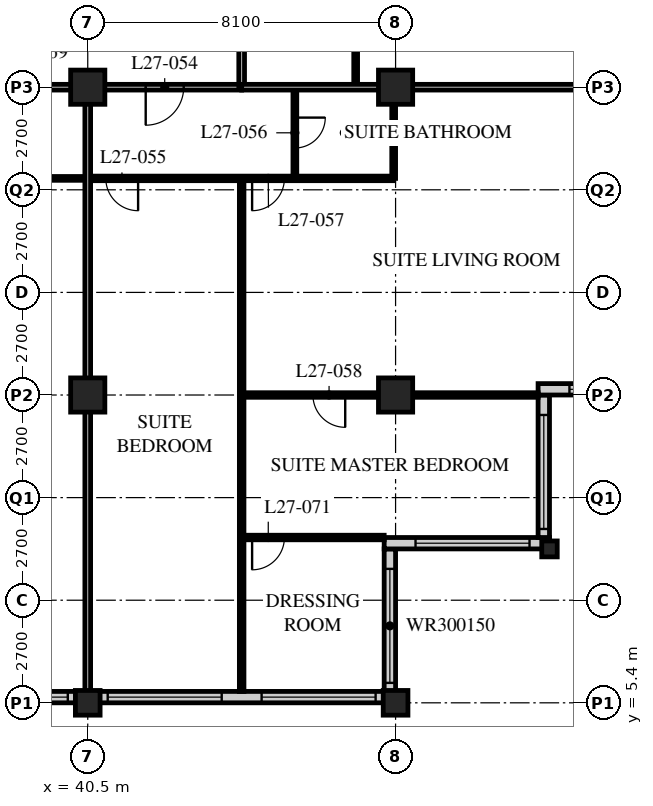
"""IFC4 building model, lengths in metres.
Left out: names, types, materials, properties, quantities, classifications, styles, units other than length and angle.
Written with IfcOpenShell. Run it as: python <this file> out.ifc"""

import sys

from ifc_helpers import new_model, si_unit, direction, frame, frame_2d, origin, origin_2d, place, context, subcontext, project, spatial, rectangle, hollow_rectangle, i_section, extrude, element, fill, save


model = new_model("IFC4")
c1 = context("Model", 3, precision=1e-05, world=origin(), true_north=direction((0.0, 1.0)))
c2 = subcontext(c1, "Body", "Model", "MODEL_VIEW")
j1 = project(units=[si_unit("LENGTHUNIT", "METRE"), si_unit("PLANEANGLEUNIT", "RADIAN")], contexts=[c1])
p1 = place(None, origin())
s1 = spatial("IfcSite", under=j1, at=p1, CompositionType="ELEMENT")
p2 = place(p1, origin())
s2 = spatial("IfcBuilding", under=s1, at=p2, CompositionType="ELEMENT")
p3 = place(p2, frame((0.0, 0.0, 110.2)))
s3 = spatial("IfcBuildingStorey", under=s2, at=p3, CompositionType="ELEMENT", Elevation=110.2)
p4 = place(p3, frame((40.5, 5.4, 0.0), z_axis=(0.0, 0.0, 1.0), x_axis=(1.0, 0.0, 0.0)))
e1 = element("IfcColumn", 1, at=p4, inside=s3, PredefinedType="COLUMN", context=c2, shape_type="SweptSolid", body=[
    extrude(hollow_rectangle(XDim=0.65, YDim=0.65, WallThickness=0.055, at=origin_2d()), origin(), (0.0, 0.0, 1.0), 3.4),
])
for number, where, z_axis, x_axis in (
    (2, (40.5, 13.5, 0.0), (0.0, 0.0, 1.0), (1.0, 0.0, 0.0)),
    (3, (40.5, 21.6, 0.0), (0.0, 0.0, 1.0), (1.0, 0.0, 0.0)),
):
    element("IfcColumn", number, at=place(p3, frame(where, z_axis=z_axis, x_axis=x_axis)), inside=s3, PredefinedType="COLUMN", context=c2, shape_type="SweptSolid", body=[
        extrude(hollow_rectangle(XDim=0.9, YDim=0.9, WallThickness=0.09, at=origin_2d()), origin(), (0.0, 0.0, 1.0), 3.4),
    ])
p5 = place(p3, frame((48.6, 5.4, 0.0), z_axis=(0.0, 0.0, 1.0), x_axis=(1.0, 0.0, 0.0)))
e4 = element("IfcColumn", 4, at=p5, inside=s3, PredefinedType="COLUMN", context=c2, shape_type="SweptSolid", body=[
    extrude(hollow_rectangle(XDim=0.65, YDim=0.65, WallThickness=0.055, at=origin_2d()), origin(), (0.0, 0.0, 1.0), 3.4),
])
for number, where, z_axis, x_axis in (
    (5, (48.6, 13.5, 0.0), (0.0, 0.0, 1.0), (1.0, 0.0, 0.0)),
    (6, (48.6, 21.6, 0.0), (0.0, 0.0, 1.0), (1.0, 0.0, 0.0)),
):
    element("IfcColumn", number, at=place(p3, frame(where, z_axis=z_axis, x_axis=x_axis)), inside=s3, PredefinedType="COLUMN", context=c2, shape_type="SweptSolid", body=[
        extrude(hollow_rectangle(XDim=0.9, YDim=0.9, WallThickness=0.09, at=origin_2d()), origin(), (0.0, 0.0, 1.0), 3.4),
    ])
p6 = place(p3, frame((52.65, 9.45, 0.0), z_axis=(0.0, 0.0, 1.0), x_axis=(1.0, 0.0, 0.0)))
e7 = element("IfcColumn", 7, at=p6, inside=s3, PredefinedType="COLUMN", context=c2, shape_type="SweptSolid", body=[
    extrude(i_section(OverallWidth=0.407, OverallDepth=0.419, WebThickness=0.031, FlangeThickness=0.049, FilletRadius=0.015, at=origin_2d()), origin(), (0.0, 0.0, 1.0), 3.4),
])
p7 = place(p3, frame((8.4, 5.55, 0.0), z_axis=(0.0, 0.0, 1.0), x_axis=(1.0, 0.0, 0.0)))
e8 = element("IfcWall", 8, at=p7, inside=s3, PredefinedType="SOLIDWALL", context=c2, shape_type="SweptSolid", body=[
    extrude(rectangle(XDim=40.2, YDim=0.3, at=frame_2d((20.1, 0.0))), origin(), (0.0, 0.0, 1.0), 3.19),
])
p8 = place(p7, frame((0.225, 0.0, 0.9)))
e9 = element("IfcOpeningElement", 9, at=p8, cuts=e8, PredefinedType="OPENING", context=c2, shape_type="SweptSolid", body=[
    extrude(rectangle(XDim=3.0, YDim=2.0, at=frame_2d((1.5, 1.0))), frame((0.0, 0.16, 0.0), z_axis=(0.0, -1.0, 0.0), x_axis=(1.0, 0.0, 0.0)), (0.0, 0.0, 1.0), 0.32),
])
p9 = place(p7, frame((4.275, 0.0, 0.9)))
e10 = element("IfcOpeningElement", 10, at=p9, cuts=e8, PredefinedType="OPENING", context=c2, shape_type="SweptSolid", body=[
    extrude(rectangle(XDim=3.0, YDim=2.0, at=frame_2d((1.5, 1.0))), frame((0.0, 0.16, 0.0), z_axis=(0.0, -1.0, 0.0), x_axis=(1.0, 0.0, 0.0)), (0.0, 0.0, 1.0), 0.32),
])
p10 = place(p7, frame((8.325, 0.0, 0.9)))
e11 = element("IfcOpeningElement", 11, at=p10, cuts=e8, PredefinedType="OPENING", context=c2, shape_type="SweptSolid", body=[
    extrude(rectangle(XDim=3.0, YDim=2.0, at=frame_2d((1.5, 1.0))), frame((0.0, 0.16, 0.0), z_axis=(0.0, -1.0, 0.0), x_axis=(1.0, 0.0, 0.0)), (0.0, 0.0, 1.0), 0.32),
])
p11 = place(p7, frame((12.375, 0.0, 0.9)))
e12 = element("IfcOpeningElement", 12, at=p11, cuts=e8, PredefinedType="OPENING", context=c2, shape_type="SweptSolid", body=[
    extrude(rectangle(XDim=3.0, YDim=2.0, at=frame_2d((1.5, 1.0))), frame((0.0, 0.16, 0.0), z_axis=(0.0, -1.0, 0.0), x_axis=(1.0, 0.0, 0.0)), (0.0, 0.0, 1.0), 0.32),
])
p12 = place(p7, frame((16.425, 0.0, 0.9)))
e13 = element("IfcOpeningElement", 13, at=p12, cuts=e8, PredefinedType="OPENING", context=c2, shape_type="SweptSolid", body=[
    extrude(rectangle(XDim=3.0, YDim=2.0, at=frame_2d((1.5, 1.0))), frame((0.0, 0.16, 0.0), z_axis=(0.0, -1.0, 0.0), x_axis=(1.0, 0.0, 0.0)), (0.0, 0.0, 1.0), 0.32),
])
p13 = place(p7, frame((20.475, 0.0, 0.9)))
e14 = element("IfcOpeningElement", 14, at=p13, cuts=e8, PredefinedType="OPENING", context=c2, shape_type="SweptSolid", body=[
    extrude(rectangle(XDim=3.0, YDim=2.0, at=frame_2d((1.5, 1.0))), frame((0.0, 0.16, 0.0), z_axis=(0.0, -1.0, 0.0), x_axis=(1.0, 0.0, 0.0)), (0.0, 0.0, 1.0), 0.32),
])
p14 = place(p7, frame((24.525, 0.0, 0.9)))
e15 = element("IfcOpeningElement", 15, at=p14, cuts=e8, PredefinedType="OPENING", context=c2, shape_type="SweptSolid", body=[
    extrude(rectangle(XDim=3.0, YDim=2.0, at=frame_2d((1.5, 1.0))), frame((0.0, 0.16, 0.0), z_axis=(0.0, -1.0, 0.0), x_axis=(1.0, 0.0, 0.0)), (0.0, 0.0, 1.0), 0.32),
])
p15 = place(p7, frame((28.575, 0.0, 0.9)))
e16 = element("IfcOpeningElement", 16, at=p15, cuts=e8, PredefinedType="OPENING", context=c2, shape_type="SweptSolid", body=[
    extrude(rectangle(XDim=3.0, YDim=2.0, at=frame_2d((1.5, 1.0))), frame((0.0, 0.16, 0.0), z_axis=(0.0, -1.0, 0.0), x_axis=(1.0, 0.0, 0.0)), (0.0, 0.0, 1.0), 0.32),
])
p16 = place(p7, frame((32.625, 0.0, 0.9)))
e17 = element("IfcOpeningElement", 17, at=p16, cuts=e8, PredefinedType="OPENING", context=c2, shape_type="SweptSolid", body=[
    extrude(rectangle(XDim=3.0, YDim=2.0, at=frame_2d((1.5, 1.0))), frame((0.0, 0.16, 0.0), z_axis=(0.0, -1.0, 0.0), x_axis=(1.0, 0.0, 0.0)), (0.0, 0.0, 1.0), 0.32),
])
p17 = place(p7, frame((36.675, 0.0, 0.9)))
e18 = element("IfcOpeningElement", 18, at=p17, cuts=e8, PredefinedType="OPENING", context=c2, shape_type="SweptSolid", body=[
    extrude(rectangle(XDim=3.0, YDim=2.0, at=frame_2d((1.5, 1.0))), frame((0.0, 0.16, 0.0), z_axis=(0.0, -1.0, 0.0), x_axis=(1.0, 0.0, 0.0)), (0.0, 0.0, 1.0), 0.32),
])
p18 = place(p3, frame((48.45, 5.7, 0.0), z_axis=(0.0, 0.0, 1.0), x_axis=(0.0, 1.0, 0.0)))
e19 = element("IfcWall", 19, at=p18, inside=s3, PredefinedType="SOLIDWALL", context=c2, shape_type="SweptSolid", body=[
    extrude(rectangle(XDim=3.75, YDim=0.3, at=frame_2d((1.875, 0.0))), origin(), (0.0, 0.0, 1.0), 3.19),
])
p19 = place(p18, frame((0.225, 0.0, 0.9)))
e20 = element("IfcOpeningElement", 20, at=p19, cuts=e19, PredefinedType="OPENING", context=c2, shape_type="SweptSolid", body=[
    extrude(rectangle(XDim=3.0, YDim=1.5, at=frame_2d((1.5, 0.75))), frame((0.0, 0.16, 0.0), z_axis=(0.0, -1.0, 0.0), x_axis=(1.0, 0.0, 0.0)), (0.0, 0.0, 1.0), 0.32),
])
p20 = place(p3, frame((48.3, 9.6, 0.0), z_axis=(0.0, 0.0, 1.0), x_axis=(1.0, 0.0, 0.0)))
e21 = element("IfcWall", 21, at=p20, inside=s3, PredefinedType="SOLIDWALL", context=c2, shape_type="SweptSolid", body=[
    extrude(rectangle(XDim=4.35, YDim=0.3, at=frame_2d((2.175, 0.0))), origin(), (0.0, 0.0, 1.0), 3.19),
])
p21 = place(p20, frame((0.825, 0.0, 0.9)))
e22 = element("IfcOpeningElement", 22, at=p21, cuts=e21, PredefinedType="OPENING", context=c2, shape_type="SweptSolid", body=[
    extrude(rectangle(XDim=3.0, YDim=1.5, at=frame_2d((1.5, 0.75))), frame((0.0, 0.16, 0.0), z_axis=(0.0, -1.0, 0.0), x_axis=(1.0, 0.0, 0.0)), (0.0, 0.0, 1.0), 0.32),
])
p22 = place(p3, frame((52.5, 9.75, 0.0), z_axis=(0.0, 0.0, 1.0), x_axis=(0.0, 1.0, 0.0)))
e23 = element("IfcWall", 23, at=p22, inside=s3, PredefinedType="SOLIDWALL", context=c2, shape_type="SweptSolid", body=[
    extrude(rectangle(XDim=3.75, YDim=0.3, at=frame_2d((1.875, 0.0))), origin(), (0.0, 0.0, 1.0), 3.19),
])
p23 = place(p22, frame((0.225, 0.0, 0.9)))
e24 = element("IfcOpeningElement", 24, at=p23, cuts=e23, PredefinedType="OPENING", context=c2, shape_type="SweptSolid", body=[
    extrude(rectangle(XDim=3.0, YDim=1.5, at=frame_2d((1.5, 0.75))), frame((0.0, 0.16, 0.0), z_axis=(0.0, -1.0, 0.0), x_axis=(1.0, 0.0, 0.0)), (0.0, 0.0, 1.0), 0.32),
])
p24 = place(p3, frame((52.35, 13.65, 0.0), z_axis=(0.0, 0.0, 1.0), x_axis=(1.0, 0.0, 0.0)))
e25 = element("IfcWall", 25, at=p24, inside=s3, PredefinedType="SOLIDWALL", context=c2, shape_type="SweptSolid", body=[
    extrude(rectangle(XDim=4.35, YDim=0.3, at=frame_2d((2.175, 0.0))), origin(), (0.0, 0.0, 1.0), 3.19),
])
p25 = place(p24, frame((0.825, 0.0, 0.9)))
e26 = element("IfcOpeningElement", 26, at=p25, cuts=e25, PredefinedType="OPENING", context=c2, shape_type="SweptSolid", body=[
    extrude(rectangle(XDim=3.0, YDim=1.5, at=frame_2d((1.5, 0.75))), frame((0.0, 0.16, 0.0), z_axis=(0.0, -1.0, 0.0), x_axis=(1.0, 0.0, 0.0)), (0.0, 0.0, 1.0), 0.32),
])
p26 = place(p3, frame((12.15, 21.6, 0.0), z_axis=(0.0, 0.0, 1.0), x_axis=(1.0, 0.0, 0.0)))
e27 = element("IfcWall", 27, at=p26, inside=s3, PredefinedType="PARTITIONING", context=c2, shape_type="SweptSolid", body=[
    extrude(rectangle(XDim=32.4, YDim=0.15, at=frame_2d((16.2, 0.0))), origin(), (0.0, 0.0, 1.0), 2.578),
])
p27 = place(p26, frame((5.95, 0.0, 0.0)))
e28 = element("IfcOpeningElement", 28, at=p27, cuts=e27, PredefinedType="OPENING", context=c2, shape_type="SweptSolid", body=[
    extrude(rectangle(XDim=1.0, YDim=2.1, at=frame_2d((0.5, 1.05))), frame((0.0, 0.085, 0.0), z_axis=(0.0, -1.0, 0.0), x_axis=(1.0, 0.0, 0.0)), (0.0, 0.0, 1.0), 0.17),
])
p28 = place(p26, frame((14.05, 0.0, 0.0)))
e29 = element("IfcOpeningElement", 29, at=p28, cuts=e27, PredefinedType="OPENING", context=c2, shape_type="SweptSolid", body=[
    extrude(rectangle(XDim=1.0, YDim=2.1, at=frame_2d((0.5, 1.05))), frame((0.0, 0.085, 0.0), z_axis=(0.0, -1.0, 0.0), x_axis=(1.0, 0.0, 0.0)), (0.0, 0.0, 1.0), 0.17),
])
p29 = place(p26, frame((22.15, 0.0, 0.0)))
e30 = element("IfcOpeningElement", 30, at=p29, cuts=e27, PredefinedType="OPENING", context=c2, shape_type="SweptSolid", body=[
    extrude(rectangle(XDim=1.0, YDim=2.1, at=frame_2d((0.5, 1.05))), frame((0.0, 0.085, 0.0), z_axis=(0.0, -1.0, 0.0), x_axis=(1.0, 0.0, 0.0)), (0.0, 0.0, 1.0), 0.17),
])
p30 = place(p26, frame((1.525, 0.0, 0.0)))
e31 = element("IfcOpeningElement", 31, at=p30, cuts=e27, PredefinedType="OPENING", context=c2, shape_type="SweptSolid", body=[
    extrude(rectangle(XDim=1.0, YDim=2.1, at=frame_2d((0.5, 1.05))), frame((0.0, 0.085, 0.0), z_axis=(0.0, -1.0, 0.0), x_axis=(1.0, 0.0, 0.0)), (0.0, 0.0, 1.0), 0.17),
])
p31 = place(p26, frame((29.875, 0.0, 0.0)))
e32 = element("IfcOpeningElement", 32, at=p31, cuts=e27, PredefinedType="OPENING", context=c2, shape_type="SweptSolid", body=[
    extrude(rectangle(XDim=1.0, YDim=2.1, at=frame_2d((0.5, 1.05))), frame((0.0, 0.085, 0.0), z_axis=(0.0, -1.0, 0.0), x_axis=(1.0, 0.0, 0.0)), (0.0, 0.0, 1.0), 0.17),
])
p32 = place(p3, frame((44.55, 21.6, 0.0), z_axis=(0.0, 0.0, 1.0), x_axis=(0.0, 1.0, 0.0)))
e33 = element("IfcWall", 33, at=p32, inside=s3, PredefinedType="PARTITIONING", context=c2, shape_type="SweptSolid", body=[
    extrude(rectangle(XDim=24.3, YDim=0.15, at=frame_2d((12.15, 0.0))), origin(), (0.0, 0.0, 1.0), 3.19),
])
p33 = place(p32, frame((2.75, 0.0, 0.0)))
e34 = element("IfcOpeningElement", 34, at=p33, cuts=e33, PredefinedType="OPENING", context=c2, shape_type="SweptSolid", body=[
    extrude(rectangle(XDim=1.0, YDim=2.1, at=frame_2d((0.5, 1.05))), frame((0.0, 0.085, 0.0), z_axis=(0.0, -1.0, 0.0), x_axis=(1.0, 0.0, 0.0)), (0.0, 0.0, 1.0), 0.17),
])
p34 = place(p32, frame((6.5, 0.0, 0.0)))
e35 = element("IfcOpeningElement", 35, at=p34, cuts=e33, PredefinedType="OPENING", context=c2, shape_type="SweptSolid", body=[
    extrude(rectangle(XDim=1.0, YDim=2.1, at=frame_2d((0.5, 1.05))), frame((0.0, 0.085, 0.0), z_axis=(0.0, -1.0, 0.0), x_axis=(1.0, 0.0, 0.0)), (0.0, 0.0, 1.0), 0.17),
])
p35 = place(p32, frame((13.55, 0.0, 0.0)))
e36 = element("IfcOpeningElement", 36, at=p35, cuts=e33, PredefinedType="OPENING", context=c2, shape_type="SweptSolid", body=[
    extrude(rectangle(XDim=1.0, YDim=2.1, at=frame_2d((0.5, 1.05))), frame((0.0, 0.085, 0.0), z_axis=(0.0, -1.0, 0.0), x_axis=(1.0, 0.0, 0.0)), (0.0, 0.0, 1.0), 0.17),
])
p36 = place(p32, frame((21.65, 0.0, 0.0)))
e37 = element("IfcOpeningElement", 37, at=p36, cuts=e33, PredefinedType="OPENING", context=c2, shape_type="SweptSolid", body=[
    extrude(rectangle(XDim=1.0, YDim=2.1, at=frame_2d((0.5, 1.05))), frame((0.0, 0.085, 0.0), z_axis=(0.0, -1.0, 0.0), x_axis=(1.0, 0.0, 0.0)), (0.0, 0.0, 1.0), 0.17),
])
p37 = place(p3, frame((37.9, 19.2, 0.0), z_axis=(0.0, 0.0, 1.0), x_axis=(1.0, 0.0, 0.0)))
e38 = element("IfcWall", 38, at=p37, inside=s3, PredefinedType="PARTITIONING", context=c2, shape_type="SweptSolid", body=[
    extrude(rectangle(XDim=2.6, YDim=0.1, at=frame_2d((1.3, 0.0))), origin(), (0.0, 0.0, 1.0), 3.19),
])
p38 = place(p3, frame((47.55, 21.6, 0.0), z_axis=(0.0, 0.0, 1.0), x_axis=(0.0, 1.0, 0.0)))
e39 = element("IfcWall", 39, at=p38, inside=s3, PredefinedType="PARTITIONING", context=c2, shape_type="SweptSolid", body=[
    extrude(rectangle(XDim=2.6, YDim=0.1, at=frame_2d((1.3, 0.0))), origin(), (0.0, 0.0, 1.0), 3.19),
])
p39 = place(p3, frame((40.5, 19.2, 0.0), z_axis=(0.0, 0.0, 1.0), x_axis=(1.0, 0.0, 0.0)))
e40 = element("IfcWall", 40, at=p39, inside=s3, PredefinedType="PARTITIONING", context=c2, shape_type="SweptSolid", body=[
    extrude(rectangle(XDim=8.05, YDim=0.12, at=frame_2d((4.025, 0.0))), origin(), (0.0, 0.0, 1.0), 3.19),
])
p40 = place(p39, frame((0.475, 0.0, 0.0)))
e41 = element("IfcOpeningElement", 41, at=p40, cuts=e40, PredefinedType="OPENING", context=c2, shape_type="SweptSolid", body=[
    extrude(rectangle(XDim=0.85, YDim=2.1, at=frame_2d((0.425, 1.05))), frame((0.0, 0.07, 0.0), z_axis=(0.0, -1.0, 0.0), x_axis=(1.0, 0.0, 0.0)), (0.0, 0.0, 1.0), 0.14),
])
p41 = place(p39, frame((4.325, 0.0, 0.0)))
e42 = element("IfcOpeningElement", 42, at=p41, cuts=e40, PredefinedType="OPENING", context=c2, shape_type="SweptSolid", body=[
    extrude(rectangle(XDim=0.85, YDim=2.1, at=frame_2d((0.425, 1.05))), frame((0.0, 0.07, 0.0), z_axis=(0.0, -1.0, 0.0), x_axis=(1.0, 0.0, 0.0)), (0.0, 0.0, 1.0), 0.14),
])
p42 = place(p3, frame((45.95, 21.6, 0.0), z_axis=(0.0, 0.0, 1.0), x_axis=(0.0, -1.0, 0.0)))
e43 = element("IfcWall", 43, at=p42, inside=s3, PredefinedType="PARTITIONING", context=c2, shape_type="SweptSolid", body=[
    extrude(rectangle(XDim=2.4, YDim=0.1, at=frame_2d((1.2, 0.0))), origin(), (0.0, 0.0, 1.0), 3.19),
])
p43 = place(p42, frame((0.8, 0.0, 0.0)))
e44 = element("IfcOpeningElement", 44, at=p43, cuts=e43, PredefinedType="OPENING", context=c2, shape_type="SweptSolid", body=[
    extrude(rectangle(XDim=0.8, YDim=2.1, at=frame_2d((0.4, 1.05))), frame((0.0, 0.06, 0.0), z_axis=(0.0, -1.0, 0.0), x_axis=(1.0, 0.0, 0.0)), (0.0, 0.0, 1.0), 0.12),
])
p44 = place(p3, frame((48.55, 21.6, 0.0), z_axis=(0.0, 0.0, 1.0), x_axis=(0.0, -1.0, 0.0)))
e45 = element("IfcWall", 45, at=p44, inside=s3, PredefinedType="PARTITIONING", context=c2, shape_type="SweptSolid", body=[
    extrude(rectangle(XDim=2.4, YDim=0.1, at=frame_2d((1.2, 0.0))), origin(), (0.0, 0.0, 1.0), 2.578),
])
p45 = place(p3, frame((44.55, 19.2, 0.0), z_axis=(0.0, 0.0, 1.0), x_axis=(0.0, -1.0, 0.0)))
e46 = element("IfcWall", 46, at=p45, inside=s3, PredefinedType="PARTITIONING", context=c2, shape_type="SweptSolid", body=[
    extrude(rectangle(XDim=13.5, YDim=0.12, at=frame_2d((6.75, 0.0))), origin(), (0.0, 0.0, 1.0), 3.19),
])
p46 = place(p3, frame((44.55, 13.5, 0.0), z_axis=(0.0, 0.0, 1.0), x_axis=(1.0, 0.0, 0.0)))
e47 = element("IfcWall", 47, at=p46, inside=s3, PredefinedType="PARTITIONING", context=c2, shape_type="SweptSolid", body=[
    extrude(rectangle(XDim=7.8, YDim=0.12, at=frame_2d((3.9, 0.0))), origin(), (0.0, 0.0, 1.0), 2.578),
])
p47 = place(p46, frame((1.875, 0.0, 0.0)))
e48 = element("IfcOpeningElement", 48, at=p47, cuts=e47, PredefinedType="OPENING", context=c2, shape_type="SweptSolid", body=[
    extrude(rectangle(XDim=0.85, YDim=2.1, at=frame_2d((0.425, 1.05))), frame((0.0, 0.07, 0.0), z_axis=(0.0, -1.0, 0.0), x_axis=(1.0, 0.0, 0.0)), (0.0, 0.0, 1.0), 0.14),
])
p48 = place(p3, frame((44.55, 21.6, 0.0), z_axis=(0.0, 0.0, 1.0), x_axis=(1.0, 0.0, 0.0)))
e49 = element("IfcWall", 49, at=p48, inside=s3, PredefinedType="PARTITIONING", context=c2, shape_type="SweptSolid", body=[
    extrude(rectangle(XDim=11.85, YDim=0.15, at=frame_2d((5.925, 0.0))), origin(), (0.0, 0.0, 1.0), 2.578),
])
p49 = place(p3, frame((40.5, 21.6, 0.0), z_axis=(0.0, 0.0, 1.0), x_axis=(0.0, -1.0, 0.0)))
e50 = element("IfcWall", 50, at=p49, inside=s3, PredefinedType="PARTITIONING", context=c2, shape_type="SweptSolid", body=[
    extrude(rectangle(XDim=15.9, YDim=0.15, at=frame_2d((7.95, 0.0))), origin(), (0.0, 0.0, 1.0), 2.578),
])
p50 = place(p3, frame((44.55, 9.75, 0.0), z_axis=(0.0, 0.0, 1.0), x_axis=(1.0, 0.0, 0.0)))
e51 = element("IfcWall", 51, at=p50, inside=s3, PredefinedType="PARTITIONING", context=c2, shape_type="SweptSolid", body=[
    extrude(rectangle(XDim=3.75, YDim=0.12, at=frame_2d((1.875, 0.0))), origin(), (0.0, 0.0, 1.0), 3.19),
])
p51 = place(p50, frame((0.275, 0.0, 0.0)))
e52 = element("IfcOpeningElement", 52, at=p51, cuts=e51, PredefinedType="OPENING", context=c2, shape_type="SweptSolid", body=[
    extrude(rectangle(XDim=0.85, YDim=2.1, at=frame_2d((0.425, 1.05))), frame((0.0, 0.07, 0.0), z_axis=(0.0, -1.0, 0.0), x_axis=(1.0, 0.0, 0.0)), (0.0, 0.0, 1.0), 0.14),
])
p52 = place(p15, origin())
e53 = element("IfcWindow", 53, at=p52, inside=s3, PartitioningType="SINGLE_PANEL", PredefinedType="WINDOW", context=c2, shape_type="SweptSolid", body=[
    extrude(rectangle(XDim=3.0, YDim=2.0, at=frame_2d((1.5, 1.0))), frame((0.0, 0.03, 0.0), z_axis=(0.0, -1.0, 0.0), x_axis=(1.0, 0.0, 0.0)), (0.0, 0.0, 1.0), 0.06),
])
fill(e16, e53)
p53 = place(p16, origin())
e54 = element("IfcWindow", 54, at=p53, inside=s3, PartitioningType="SINGLE_PANEL", PredefinedType="WINDOW", context=c2, shape_type="SweptSolid", body=[
    extrude(rectangle(XDim=3.0, YDim=2.0, at=frame_2d((1.5, 1.0))), frame((0.0, 0.03, 0.0), z_axis=(0.0, -1.0, 0.0), x_axis=(1.0, 0.0, 0.0)), (0.0, 0.0, 1.0), 0.06),
])
fill(e17, e54)
p54 = place(p17, origin())
e55 = element("IfcWindow", 55, at=p54, inside=s3, PartitioningType="SINGLE_PANEL", PredefinedType="WINDOW", context=c2, shape_type="SweptSolid", body=[
    extrude(rectangle(XDim=3.0, YDim=2.0, at=frame_2d((1.5, 1.0))), frame((0.0, 0.03, 0.0), z_axis=(0.0, -1.0, 0.0), x_axis=(1.0, 0.0, 0.0)), (0.0, 0.0, 1.0), 0.06),
])
fill(e18, e55)
p55 = place(p19, origin())
e56 = element("IfcWindow", 56, at=p55, inside=s3, PartitioningType="SINGLE_PANEL", PredefinedType="WINDOW", context=c2, shape_type="SweptSolid", body=[
    extrude(rectangle(XDim=3.0, YDim=1.5, at=frame_2d((1.5, 0.75))), frame((0.0, 0.03, 0.0), z_axis=(0.0, -1.0, 0.0), x_axis=(1.0, 0.0, 0.0)), (0.0, 0.0, 1.0), 0.06),
])
fill(e20, e56)
p56 = place(p21, origin())
e57 = element("IfcWindow", 57, at=p56, inside=s3, PartitioningType="SINGLE_PANEL", PredefinedType="WINDOW", context=c2, shape_type="SweptSolid", body=[
    extrude(rectangle(XDim=3.0, YDim=1.5, at=frame_2d((1.5, 0.75))), frame((0.0, 0.03, 0.0), z_axis=(0.0, -1.0, 0.0), x_axis=(1.0, 0.0, 0.0)), (0.0, 0.0, 1.0), 0.06),
])
fill(e22, e57)
p57 = place(p23, origin())
e58 = element("IfcWindow", 58, at=p57, inside=s3, PartitioningType="SINGLE_PANEL", PredefinedType="WINDOW", context=c2, shape_type="SweptSolid", body=[
    extrude(rectangle(XDim=3.0, YDim=1.5, at=frame_2d((1.5, 0.75))), frame((0.0, 0.03, 0.0), z_axis=(0.0, -1.0, 0.0), x_axis=(1.0, 0.0, 0.0)), (0.0, 0.0, 1.0), 0.06),
])
fill(e24, e58)
p58 = place(p25, origin())
e59 = element("IfcWindow", 59, at=p58, inside=s3, PartitioningType="SINGLE_PANEL", PredefinedType="WINDOW", context=c2, shape_type="SweptSolid", body=[
    extrude(rectangle(XDim=3.0, YDim=1.5, at=frame_2d((1.5, 0.75))), frame((0.0, 0.03, 0.0), z_axis=(0.0, -1.0, 0.0), x_axis=(1.0, 0.0, 0.0)), (0.0, 0.0, 1.0), 0.06),
])
fill(e26, e59)
p59 = place(p31, origin())
e60 = element("IfcDoor", 60, at=p59, inside=s3, OperationType="SINGLE_SWING_RIGHT", PredefinedType="DOOR", context=c2, shape_type="SweptSolid", body=[
    extrude(rectangle(XDim=1.0, YDim=2.1, at=frame_2d((0.5, 1.05))), frame((0.0, 0.025, 0.0), z_axis=(0.0, -1.0, 0.0), x_axis=(1.0, 0.0, 0.0)), (0.0, 0.0, 1.0), 0.05),
])
fill(e32, e60)
p60 = place(p40, origin())
e61 = element("IfcDoor", 61, at=p60, inside=s3, OperationType="SINGLE_SWING_LEFT", PredefinedType="DOOR", context=c2, shape_type="SweptSolid", body=[
    extrude(rectangle(XDim=0.85, YDim=2.1, at=frame_2d((0.425, 1.05))), frame((0.0, 0.025, 0.0), z_axis=(0.0, -1.0, 0.0), x_axis=(1.0, 0.0, 0.0)), (0.0, 0.0, 1.0), 0.05),
])
fill(e41, e61)
p61 = place(p43, origin())
e62 = element("IfcDoor", 62, at=p61, inside=s3, OperationType="SINGLE_SWING_LEFT", PredefinedType="DOOR", context=c2, shape_type="SweptSolid", body=[
    extrude(rectangle(XDim=0.8, YDim=2.1, at=frame_2d((0.4, 1.05))), frame((0.0, 0.025, 0.0), z_axis=(0.0, -1.0, 0.0), x_axis=(1.0, 0.0, 0.0)), (0.0, 0.0, 1.0), 0.05),
])
fill(e44, e62)
p62 = place(p41, origin())
e63 = element("IfcDoor", 63, at=p62, inside=s3, OperationType="SINGLE_SWING_RIGHT", PredefinedType="DOOR", context=c2, shape_type="SweptSolid", body=[
    extrude(rectangle(XDim=0.85, YDim=2.1, at=frame_2d((0.425, 1.05))), frame((0.0, 0.025, 0.0), z_axis=(0.0, -1.0, 0.0), x_axis=(1.0, 0.0, 0.0)), (0.0, 0.0, 1.0), 0.05),
])
fill(e42, e63)
p63 = place(p47, origin())
e64 = element("IfcDoor", 64, at=p63, inside=s3, OperationType="SINGLE_SWING_LEFT", PredefinedType="DOOR", context=c2, shape_type="SweptSolid", body=[
    extrude(rectangle(XDim=0.85, YDim=2.1, at=frame_2d((0.425, 1.05))), frame((0.0, 0.025, 0.0), z_axis=(0.0, -1.0, 0.0), x_axis=(1.0, 0.0, 0.0)), (0.0, 0.0, 1.0), 0.05),
])
fill(e48, e64)
p64 = place(p51, origin())
e65 = element("IfcDoor", 65, at=p64, inside=s3, OperationType="SINGLE_SWING_RIGHT", PredefinedType="DOOR", context=c2, shape_type="SweptSolid", body=[
    extrude(rectangle(XDim=0.85, YDim=2.1, at=frame_2d((0.425, 1.05))), frame((0.0, 0.025, 0.0), z_axis=(0.0, -1.0, 0.0), x_axis=(1.0, 0.0, 0.0)), (0.0, 0.0, 1.0), 0.05),
])
fill(e52, e65)
save(model, sys.argv[1])
